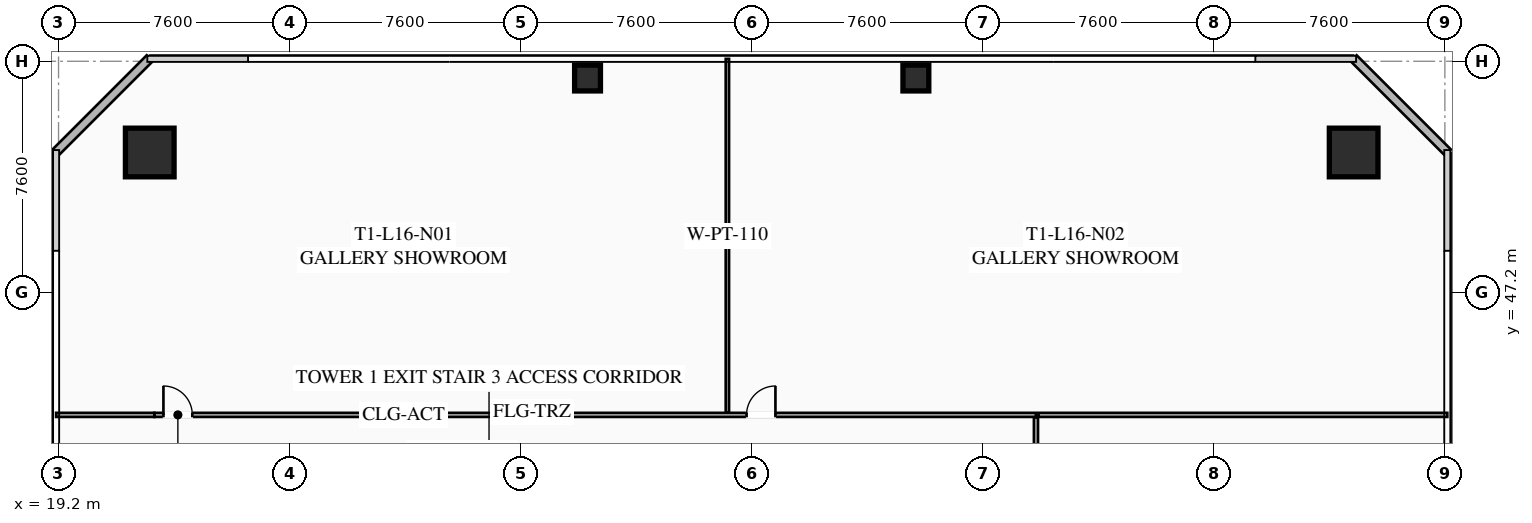
"""IFC4 building model, lengths in metres.
Left out: names, types, materials, properties, quantities, classifications, styles, units other than length and angle.
Written with IfcOpenShell. Run it as: python <this file> out.ifc"""

import sys

from ifc_helpers import new_model, si_unit, direction, frame, frame_2d, origin, origin_2d, place, context, subcontext, project, spatial, rectangle, hollow_rectangle, extrude, element, fill, save


model = new_model("IFC4")
c1 = context("Model", 3, precision=1e-05, world=origin(), true_north=direction((0.0, 1.0)))
c2 = subcontext(c1, "Body", "Model", "MODEL_VIEW")
j1 = project(units=[si_unit("LENGTHUNIT", "METRE"), si_unit("PLANEANGLEUNIT", "RADIAN")], contexts=[c1])
p1 = place(None, origin())
s1 = spatial("IfcSite", under=j1, at=p1, CompositionType="ELEMENT")
p2 = place(p1, origin())
s2 = spatial("IfcBuilding", under=s1, at=p2, CompositionType="ELEMENT")
p3 = place(p2, frame((0.0, 0.0, 63.65)))
s3 = spatial("IfcBuildingStorey", under=s2, at=p3, CompositionType="ELEMENT", Elevation=63.65)
for number, where, z_axis, x_axis in (
    (1, (61.8, 51.8, 0.0), (0.0, 0.0, 1.0), (1.0, 0.0, 0.0)),
    (2, (22.2, 51.8, 0.0), (0.0, 0.0, 1.0), (1.0, 0.0, 0.0)),
):
    element("IfcColumn", number, at=place(p3, frame(where, z_axis=z_axis, x_axis=x_axis)), inside=s3, PredefinedType="COLUMN", context=c2, shape_type="SweptSolid", body=[
        extrude(hollow_rectangle(XDim=1.6, YDim=1.6, WallThickness=0.06, at=origin_2d()), origin(), (0.0, 0.0, 1.0), 3.35),
    ])
for number, where, z_axis, x_axis in (
    (3, (47.4, 54.25, 0.0), (0.0, 0.0, 1.0), (1.0, 0.0, 0.0)),
    (4, (36.6, 54.25, 0.0), (0.0, 0.0, 1.0), (1.0, 0.0, 0.0)),
):
    element("IfcColumn", number, at=place(p3, frame(where, z_axis=z_axis, x_axis=x_axis)), inside=s3, PredefinedType="COLUMN", context=c2, shape_type="SweptSolid", body=[
        extrude(hollow_rectangle(XDim=0.85, YDim=0.85, WallThickness=0.035, at=origin_2d()), origin(), (0.0, 0.0, 1.0), 3.35),
    ])
for number, where, z_axis, x_axis in (
    (5, (19.1, 51.8, 0.0), (0.0, 0.0, 1.0), (0.707, 0.707, 0.0)),
    (6, (61.8, 54.9, 0.0), (0.0, 0.0, 1.0), (0.707, -0.707, 0.0)),
):
    element("IfcWall", number, at=place(p3, frame(where, z_axis=z_axis, x_axis=x_axis)), inside=s3, PredefinedType="SOLIDWALL", context=c2, shape_type="SweptSolid", body=[
        extrude(rectangle(XDim=4.384, YDim=0.28, at=frame_2d((2.192, 0.0))), origin(), (0.0, 0.0, 1.0), 3.35),
    ])
p4 = place(p3, frame((22.35, 43.17, 0.0), z_axis=(0.0, 0.0, 1.0), x_axis=(1.0, 0.0, 0.0)))
e7 = element("IfcWall", 7, at=p4, inside=s3, PredefinedType="PARTITIONING", context=c2, shape_type="SweptSolid", body=[
    extrude(rectangle(XDim=29.0, YDim=0.135, at=frame_2d((14.5, 0.0))), origin(), (0.0, 0.0, 1.0), 2.493),
])
p5 = place(p4, frame((0.3, 0.0, 0.0)))
e8 = element("IfcOpeningElement", 8, at=p5, cuts=e7, PredefinedType="OPENING", context=c2, shape_type="SweptSolid", body=[
    extrude(rectangle(XDim=0.95, YDim=2.05, at=frame_2d((0.475, 1.025))), frame((0.0, 0.077, 0.0), z_axis=(0.0, -1.0, 0.0), x_axis=(1.0, 0.0, 0.0)), (0.0, 0.0, 1.0), 0.155),
])
p6 = place(p4, frame((19.481, 0.0, 0.0)))
e9 = element("IfcOpeningElement", 9, at=p6, cuts=e7, PredefinedType="OPENING", context=c2, shape_type="SweptSolid", body=[
    extrude(rectangle(XDim=0.95, YDim=2.05, at=frame_2d((0.475, 1.025))), frame((0.0, 0.077, 0.0), z_axis=(0.0, -1.0, 0.0), x_axis=(1.0, 0.0, 0.0)), (0.0, 0.0, 1.0), 0.155),
])
p7 = place(p3, frame((19.12, 43.17, 0.0), z_axis=(0.0, 0.0, 1.0), x_axis=(1.0, 0.0, 0.0)))
e10 = element("IfcWall", 10, at=p7, inside=s3, PredefinedType="PARTITIONING", context=c2, shape_type="SweptSolid", body=[
    extrude(rectangle(XDim=3.23, YDim=0.135, at=frame_2d((1.615, 0.0))), origin(), (0.0, 0.0, 1.0), 2.493),
])
p8 = place(p3, frame((41.2, 43.25, 0.0), z_axis=(0.0, 0.0, 1.0), x_axis=(0.0, 1.0, 0.0)))
e11 = element("IfcWall", 11, at=p8, inside=s3, PredefinedType="PARTITIONING", context=c2, shape_type="SweptSolid", body=[
    extrude(rectangle(XDim=11.63, YDim=0.11, at=frame_2d((5.815, 0.0))), origin(), (0.0, 0.0, 1.0), 2.493),
])
p9 = place(p3, frame((51.35, 43.09, 0.0), z_axis=(0.0, 0.0, 1.0), x_axis=(0.0, -1.0, 0.0)))
e12 = element("IfcWall", 12, at=p9, inside=s3, PredefinedType="PARTITIONING", context=c2, shape_type="SweptSolid", body=[
    extrude(rectangle(XDim=20.36, YDim=0.135, at=frame_2d((10.18, 0.0))), origin(), (0.0, 0.0, 1.0), 2.493),
])
p10 = place(p9, frame((10.332, 0.0, 0.0)))
e13 = element("IfcOpeningElement", 13, at=p10, cuts=e12, PredefinedType="OPENING", context=c2, shape_type="SweptSolid", body=[
    extrude(rectangle(XDim=0.95, YDim=2.05, at=frame_2d((0.475, 1.025))), frame((0.0, 0.077, 0.0), z_axis=(0.0, -1.0, 0.0), x_axis=(1.0, 0.0, 0.0)), (0.0, 0.0, 1.0), 0.155),
])
p11 = place(p3, frame((64.88, 43.17, 0.0), z_axis=(0.0, 0.0, 1.0), x_axis=(-1.0, 0.0, 0.0)))
e14 = element("IfcWall", 14, at=p11, inside=s3, PredefinedType="PARTITIONING", context=c2, shape_type="SweptSolid", body=[
    extrude(rectangle(XDim=13.45, YDim=0.135, at=frame_2d((6.725, 0.0))), origin(), (0.0, 0.0, 1.0), 2.493),
])
p12 = place(p5, origin())
e15 = element("IfcDoor", 15, at=p12, inside=s3, OperationType="SINGLE_SWING_LEFT", PredefinedType="DOOR", context=c2, shape_type="SweptSolid", body=[
    extrude(rectangle(XDim=0.95, YDim=2.05, at=frame_2d((0.475, 1.025))), frame((0.0, 0.025, 0.0), z_axis=(0.0, -1.0, 0.0), x_axis=(1.0, 0.0, 0.0)), (0.0, 0.0, 1.0), 0.05),
])
fill(e8, e15)
p13 = place(p6, origin())
e16 = element("IfcDoor", 16, at=p13, inside=s3, OperationType="SINGLE_SWING_RIGHT", PredefinedType="DOOR", context=c2, shape_type="SweptSolid", body=[
    extrude(rectangle(XDim=0.95, YDim=2.05, at=frame_2d((0.475, 1.025))), frame((0.0, 0.025, 0.0), z_axis=(0.0, -1.0, 0.0), x_axis=(1.0, 0.0, 0.0)), (0.0, 0.0, 1.0), 0.05),
])
fill(e9, e16)
save(model, sys.argv[1])
